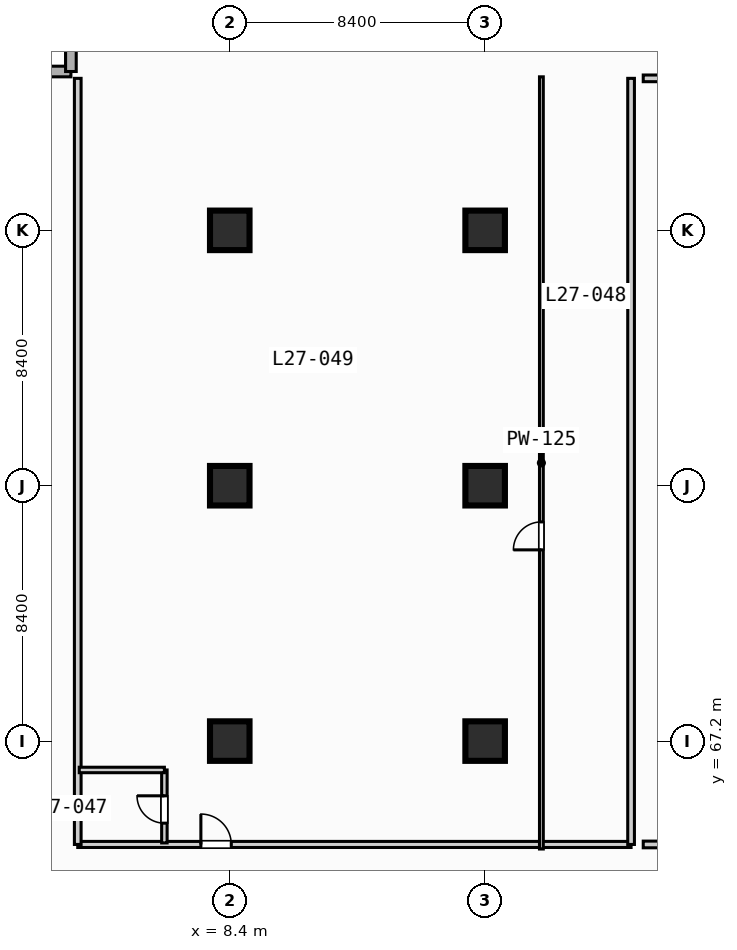
"""IFC4 building model, lengths in metres.
Left out: names, types, materials, properties, quantities, classifications, styles, units other than length and angle.
Written with IfcOpenShell. Run it as: python <this file> out.ifc"""

import sys

from ifc_helpers import new_model, si_unit, direction, frame, frame_2d, origin, origin_2d, place, context, subcontext, project, spatial, rectangle, extrude, element, fill, save


model = new_model("IFC4")
c1 = context("Model", 3, precision=1e-05, world=origin(), true_north=direction((0.0, 1.0)))
c2 = subcontext(c1, "Body", "Model", "MODEL_VIEW")
j1 = project(units=[si_unit("LENGTHUNIT", "METRE"), si_unit("PLANEANGLEUNIT", "RADIAN")], contexts=[c1])
p1 = place(None, origin())
s1 = spatial("IfcSite", under=j1, at=p1, CompositionType="ELEMENT")
p2 = place(p1, origin())
s2 = spatial("IfcBuilding", under=s1, at=p2, CompositionType="ELEMENT")
p3 = place(p2, frame((0.0, 0.0, 115.2)))
s3 = spatial("IfcBuildingStorey", under=s2, at=p3, CompositionType="ELEMENT", Elevation=115.2)
for number, where, z_axis, x_axis in (
    (1, (8.4, 67.2, 0.0), (0.0, 0.0, 1.0), (1.0, 0.0, 0.0)),
    (2, (8.4, 75.6, 0.0), (0.0, 0.0, 1.0), (1.0, 0.0, 0.0)),
    (3, (8.4, 84.0, 0.0), (0.0, 0.0, 1.0), (1.0, 0.0, 0.0)),
    (4, (16.8, 67.2, 0.0), (0.0, 0.0, 1.0), (1.0, 0.0, 0.0)),
    (5, (16.8, 75.6, 0.0), (0.0, 0.0, 1.0), (1.0, 0.0, 0.0)),
    (6, (16.8, 84.0, 0.0), (0.0, 0.0, 1.0), (1.0, 0.0, 0.0)),
):
    element("IfcColumn", number, at=place(p3, frame(where, z_axis=z_axis, x_axis=x_axis)), inside=s3, PredefinedType="COLUMN", context=c2, shape_type="SweptSolid", body=[
        extrude(rectangle(XDim=1.3, YDim=1.3, at=origin_2d()), origin(), (0.0, 0.0, 1.0), 3.8),
    ])
for number, where, z_axis, x_axis in (
    (7, (0.175, 89.225, 0.0), (0.0, 0.0, 1.0), (1.0, 0.0, 0.0)),
    (8, (3.175, 89.225, 0.0), (0.0, 0.0, 1.0), (0.0, 1.0, 0.0)),
):
    element("IfcWall", number, at=place(p3, frame(where, z_axis=z_axis, x_axis=x_axis)), inside=s3, PredefinedType="STANDARD", context=c2, shape_type="SweptSolid", body=[
        extrude(rectangle(XDim=3.0, YDim=0.35, at=frame_2d((1.5, 0.0))), origin(), (0.0, 0.0, 1.0), 3.55),
    ])
p4 = place(p3, frame((3.4, 63.8, 0.0), z_axis=(0.0, 0.0, 1.0), x_axis=(1.0, 0.0, 0.0)))
e9 = element("IfcWall", 9, at=p4, inside=s3, PredefinedType="PARTITIONING", context=c2, shape_type="SweptSolid", body=[
    extrude(rectangle(XDim=18.2, YDim=0.2, at=frame_2d((9.1, 0.0))), origin(), (0.0, 0.0, 1.0), 3.55),
])
p5 = place(p4, frame((4.05, 0.0, 0.0)))
e10 = element("IfcOpeningElement", 10, at=p5, cuts=e9, PredefinedType="OPENING", context=c2, shape_type="SweptSolid", body=[
    extrude(rectangle(XDim=1.0, YDim=2.15, at=frame_2d((0.5, 1.075))), frame((0.0, 0.11, 0.0), z_axis=(0.0, -1.0, 0.0), x_axis=(1.0, 0.0, 0.0)), (0.0, 0.0, 1.0), 0.22),
])
for number, where, z_axis, x_axis in (
    (11, (21.6, 63.8, 0.0), (0.0, 0.0, 1.0), (0.0, 1.0, 0.0)),
    (12, (3.4, 63.8, 0.0), (0.0, 0.0, 1.0), (0.0, 1.0, 0.0)),
):
    element("IfcWall", number, at=place(p3, frame(where, z_axis=z_axis, x_axis=x_axis)), inside=s3, PredefinedType="PARTITIONING", context=c2, shape_type="SweptSolid", body=[
        extrude(rectangle(XDim=25.2, YDim=0.22, at=frame_2d((12.6, 0.0))), origin(), (0.0, 0.0, 1.0), 3.55),
    ])
p6 = place(p3, frame((6.25, 63.85, 0.0), z_axis=(0.0, 0.0, 1.0), x_axis=(0.0, 1.0, 0.0)))
e13 = element("IfcWall", 13, at=p6, inside=s3, PredefinedType="PLUMBINGWALL", context=c2, shape_type="SweptSolid", body=[
    extrude(rectangle(XDim=2.4, YDim=0.18, at=frame_2d((1.2, 0.0))), origin(), (0.0, 0.0, 1.0), 3.55),
])
p7 = place(p6, frame((0.65, 0.0, 0.0)))
e14 = element("IfcOpeningElement", 14, at=p7, cuts=e13, PredefinedType="OPENING", context=c2, shape_type="SweptSolid", body=[
    extrude(rectangle(XDim=0.9, YDim=2.1, at=frame_2d((0.45, 1.05))), frame((0.0, 0.1, 0.0), z_axis=(0.0, -1.0, 0.0), x_axis=(1.0, 0.0, 0.0)), (0.0, 0.0, 1.0), 0.2),
])
p8 = place(p3, frame((3.45, 66.25, 0.0), z_axis=(0.0, 0.0, 1.0), x_axis=(1.0, 0.0, 0.0)))
e15 = element("IfcWall", 15, at=p8, inside=s3, PredefinedType="PLUMBINGWALL", context=c2, shape_type="SweptSolid", body=[
    extrude(rectangle(XDim=2.8, YDim=0.18, at=frame_2d((1.4, 0.0))), origin(), (0.0, 0.0, 1.0), 3.55),
])
p9 = place(p3, frame((18.65, 63.65, 0.0), z_axis=(0.0, 0.0, 1.0), x_axis=(0.0, 1.0, 0.0)))
e16 = element("IfcWall", 16, at=p9, inside=s3, PredefinedType="PARTITIONING", context=c2, shape_type="SweptSolid", body=[
    extrude(rectangle(XDim=25.4, YDim=0.125, at=frame_2d((12.7, 0.0))), origin(), (0.0, 0.0, 1.0), 3.55),
])
p10 = place(p9, frame((9.84, 0.0, 0.0)))
e17 = element("IfcOpeningElement", 17, at=p10, cuts=e16, PredefinedType="OPENING", context=c2, shape_type="SweptSolid", body=[
    extrude(rectangle(XDim=0.92, YDim=2.1, at=frame_2d((0.46, 1.05))), frame((0.0, 0.073, 0.0), z_axis=(0.0, -1.0, 0.0), x_axis=(1.0, 0.0, 0.0)), (0.0, 0.0, 1.0), 0.145),
])
p11 = place(p3, frame((22.0, 89.0, 0.0), z_axis=(0.0, 0.0, 1.0), x_axis=(1.0, 0.0, 0.0)))
e18 = element("IfcWall", 18, at=p11, inside=s3, PredefinedType="PARTITIONING", context=c2, shape_type="SweptSolid", body=[
    extrude(rectangle(XDim=11.3, YDim=0.22, at=frame_2d((5.65, 0.0))), origin(), (0.0, 0.0, 1.0), 3.55),
])
p12 = place(p3, frame((22.0, 63.8, 0.0), z_axis=(0.0, 0.0, 1.0), x_axis=(1.0, 0.0, 0.0)))
e19 = element("IfcWall", 19, at=p12, inside=s3, PredefinedType="PARTITIONING", context=c2, shape_type="SweptSolid", body=[
    extrude(rectangle(XDim=6.0, YDim=0.22, at=frame_2d((3.0, 0.0))), origin(), (0.0, 0.0, 1.0), 3.55),
])
p13 = place(p5, origin())
e20 = element("IfcDoor", 20, at=p13, inside=s3, OperationType="SINGLE_SWING_LEFT", PredefinedType="DOOR", context=c2, shape_type="SweptSolid", body=[
    extrude(rectangle(XDim=1.0, YDim=2.15, at=frame_2d((0.5, 1.075))), frame((0.0, 0.025, 0.0), z_axis=(0.0, -1.0, 0.0), x_axis=(1.0, 0.0, 0.0)), (0.0, 0.0, 1.0), 0.05),
])
fill(e10, e20)
p14 = place(p7, origin())
e21 = element("IfcDoor", 21, at=p14, inside=s3, OperationType="SINGLE_SWING_RIGHT", PredefinedType="DOOR", context=c2, shape_type="SweptSolid", body=[
    extrude(rectangle(XDim=0.9, YDim=2.1, at=frame_2d((0.45, 1.05))), frame((0.0, 0.025, 0.0), z_axis=(0.0, -1.0, 0.0), x_axis=(1.0, 0.0, 0.0)), (0.0, 0.0, 1.0), 0.05),
])
fill(e14, e21)
p15 = place(p10, origin())
e22 = element("IfcDoor", 22, at=p15, inside=s3, OperationType="SINGLE_SWING_LEFT", PredefinedType="DOOR", context=c2, shape_type="SweptSolid", body=[
    extrude(rectangle(XDim=0.92, YDim=2.1, at=frame_2d((0.46, 1.05))), frame((0.0, 0.025, 0.0), z_axis=(0.0, -1.0, 0.0), x_axis=(1.0, 0.0, 0.0)), (0.0, 0.0, 1.0), 0.05),
])
fill(e17, e22)
save(model, sys.argv[1])
